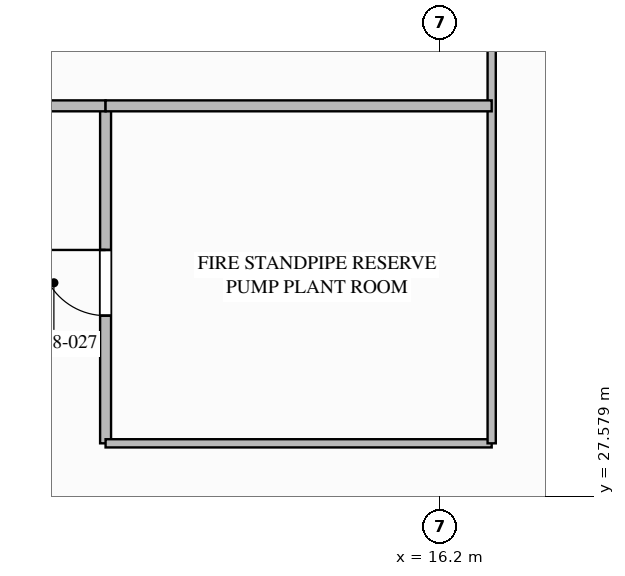
"""IFC4 building model, lengths in metres.
Left out: names, types, materials, properties, quantities, classifications, styles, units other than length and angle.
Written with IfcOpenShell. Run it as: python <this file> out.ifc"""

import sys

from ifc_helpers import new_model, si_unit, direction, frame, frame_2d, origin, place, context, subcontext, project, spatial, rectangle, extrude, element, fill, save


model = new_model("IFC4")
c1 = context("Model", 3, precision=1e-05, world=origin(), true_north=direction((0.0, 1.0)))
c2 = subcontext(c1, "Body", "Model", "MODEL_VIEW")
j1 = project(units=[si_unit("LENGTHUNIT", "METRE"), si_unit("PLANEANGLEUNIT", "RADIAN")], contexts=[c1])
p1 = place(None, origin())
s1 = spatial("IfcSite", under=j1, at=p1, CompositionType="ELEMENT")
p2 = place(p1, origin())
s2 = spatial("IfcBuilding", under=s1, at=p2, CompositionType="ELEMENT")
p3 = place(p2, frame((0.0, 0.0, 260.0)))
s3 = spatial("IfcBuildingStorey", under=s2, at=p3, CompositionType="ELEMENT", Elevation=260.0)
p4 = place(p3, frame((10.7, 28.45, 0.0), z_axis=(0.0, 0.0, 1.0), x_axis=(0.0, 1.0, 0.0)))
e1 = element("IfcWall", 1, at=p4, inside=s3, PredefinedType="SOLIDWALL", context=c2, shape_type="SweptSolid", body=[
    extrude(rectangle(XDim=5.55, YDim=0.18, at=frame_2d((2.775, 0.0))), origin(), (0.0, 0.0, 1.0), 4.74),
])
p5 = place(p4, frame((2.1, 0.0, 0.0)))
e2 = element("IfcOpeningElement", 2, at=p5, cuts=e1, PredefinedType="OPENING", context=c2, shape_type="SweptSolid", body=[
    extrude(rectangle(XDim=1.08, YDim=2.04, at=frame_2d((0.54, 1.02))), frame((0.0, 0.1, 0.0), z_axis=(0.0, -1.0, 0.0), x_axis=(1.0, 0.0, 0.0)), (0.0, 0.0, 1.0), 0.2),
])
p6 = place(p3, frame((8.6, 34.0, 0.0), z_axis=(0.0, 0.0, 1.0), x_axis=(1.0, 0.0, 0.0)))
e3 = element("IfcWall", 3, at=p6, inside=s3, PredefinedType="SOLIDWALL", context=c2, shape_type="SweptSolid", body=[
    extrude(rectangle(XDim=2.1, YDim=0.18, at=frame_2d((1.05, 0.0))), origin(), (0.0, 0.0, 1.0), 4.74),
])
p7 = place(p3, frame((10.7, 28.45, 0.0), z_axis=(0.0, 0.0, 1.0), x_axis=(1.0, 0.0, 0.0)))
e4 = element("IfcWall", 4, at=p7, inside=s3, PredefinedType="PARTITIONING", context=c2, shape_type="SweptSolid", body=[
    extrude(rectangle(XDim=6.35, YDim=0.135, at=frame_2d((3.175, 0.0))), origin(), (0.0, 0.0, 1.0), 4.74),
])
p8 = place(p3, frame((17.05, 28.45, 0.0), z_axis=(0.0, 0.0, 1.0), x_axis=(0.0, 1.0, 0.0)))
e5 = element("IfcWall", 5, at=p8, inside=s3, PredefinedType="PARTITIONING", context=c2, shape_type="SweptSolid", body=[
    extrude(rectangle(XDim=15.6, YDim=0.135, at=frame_2d((7.8, 0.0))), origin(), (0.0, 0.0, 1.0), 4.74),
])
p9 = place(p3, frame((10.7, 34.0, 0.0), z_axis=(0.0, 0.0, 1.0), x_axis=(1.0, 0.0, 0.0)))
e6 = element("IfcWall", 6, at=p9, inside=s3, PredefinedType="SOLIDWALL", context=c2, shape_type="SweptSolid", body=[
    extrude(rectangle(XDim=6.35, YDim=0.18, at=frame_2d((3.175, 0.0))), origin(), (0.0, 0.0, 1.0), 4.74),
])
p10 = place(p5, origin())
e7 = element("IfcDoor", 7, at=p10, inside=s3, OperationType="SINGLE_SWING_RIGHT", PredefinedType="DOOR", context=c2, shape_type="SweptSolid", body=[
    extrude(rectangle(XDim=1.08, YDim=2.04, at=frame_2d((0.54, 1.02))), frame((0.0, 0.025, 0.0), z_axis=(0.0, -1.0, 0.0), x_axis=(1.0, 0.0, 0.0)), (0.0, 0.0, 1.0), 0.05),
])
fill(e2, e7)
save(model, sys.argv[1])
